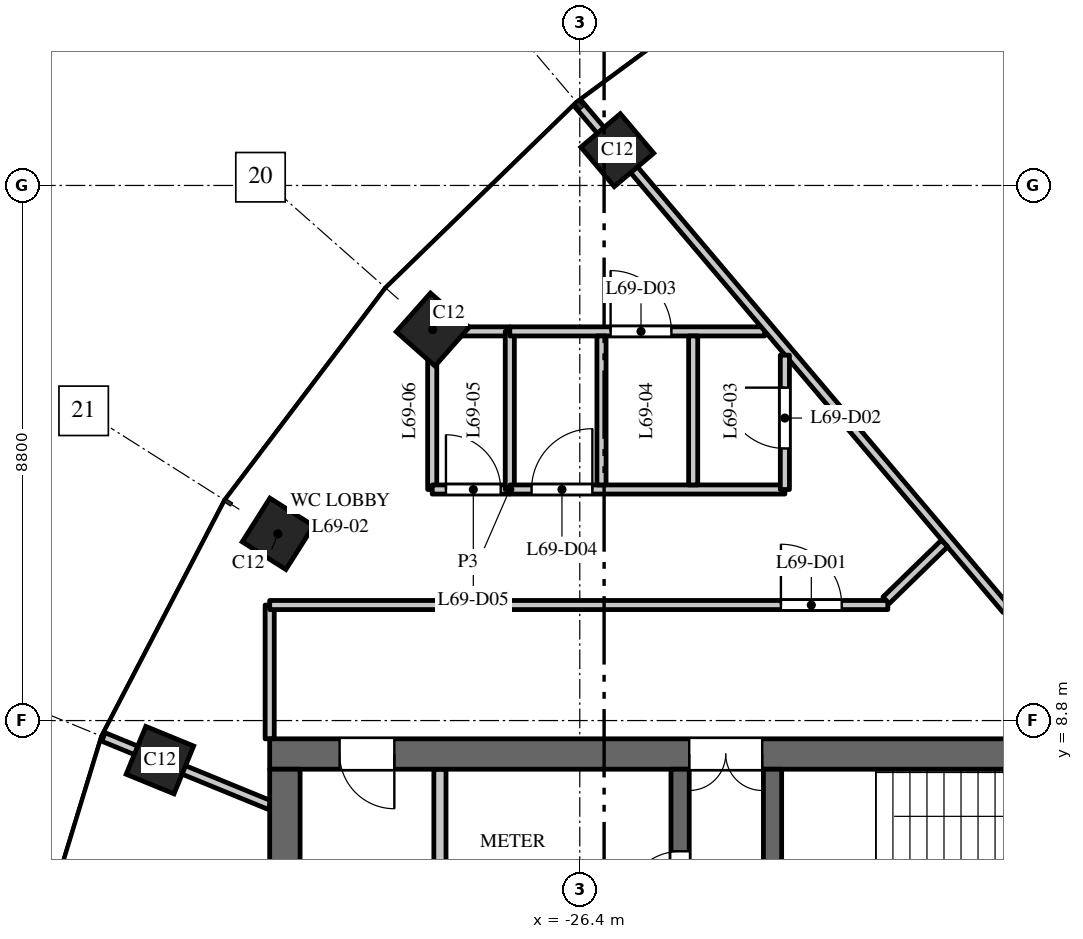
"""IFC4 building model, lengths in metres.
Left out: names, types, materials, properties, quantities, classifications, styles, units other than length and angle.
Written with IfcOpenShell. Run it as: python <this file> out.ifc"""

import sys

from ifc_helpers import new_model, si_unit, direction, frame, frame_2d, origin, origin_2d, place, context, subcontext, project, spatial, rectangle, extrude, element, fill, save


model = new_model("IFC4")
c1 = context("Model", 3, precision=1e-05, world=origin(), true_north=direction((0.0, 1.0)))
c2 = subcontext(c1, "Body", "Model", "MODEL_VIEW")
j1 = project(units=[si_unit("LENGTHUNIT", "METRE"), si_unit("PLANEANGLEUNIT", "RADIAN")], contexts=[c1])
p1 = place(None, origin())
s1 = spatial("IfcSite", under=j1, at=p1, CompositionType="ELEMENT")
p2 = place(p1, origin())
s2 = spatial("IfcBuilding", under=s1, at=p2, CompositionType="ELEMENT")
p3 = place(p2, frame((0.0, 0.0, 319.0)))
s3 = spatial("IfcBuildingStorey", under=s2, at=p3, CompositionType="ELEMENT", Elevation=319.0)
for number, where, z_axis, x_axis in (
    (1, (-25.783, 18.18, 0.0), (0.0, 0.0, 1.0), (-0.763, -0.646, 0.0)),
    (2, (-28.819, 15.23, 0.0), (0.0, 0.0, 1.0), (-0.663, -0.749, 0.0)),
    (3, (-31.365, 11.871, 0.0), (0.0, 0.0, 1.0), (-0.535, -0.845, 0.0)),
    (4, (-33.305, 8.149, 0.0), (0.0, 0.0, 1.0), (-0.379, -0.925, 0.0)),
):
    element("IfcColumn", number, at=place(p3, frame(where, z_axis=z_axis, x_axis=x_axis)), inside=s3, PredefinedType="COLUMN", context=c2, shape_type="SweptSolid", body=[
        extrude(rectangle(XDim=0.85, YDim=0.85, at=origin_2d()), origin(), (0.0, 0.0, 1.0), 4.0),
    ])
p4 = place(p3, frame((-16.5, 8.25, 0.0), z_axis=(0.0, 0.0, 1.0), x_axis=(-1.0, 0.0, 0.0)))
e5 = element("IfcWall", 5, at=p4, inside=s3, PredefinedType="SHEAR", context=c2, shape_type="SweptSolid", body=[
    extrude(rectangle(XDim=15.0, YDim=0.5, at=frame_2d((7.5, 0.0))), origin(), (0.0, 0.0, 1.0), 3.7),
])
p5 = place(p4, frame((6.9, 0.0, 0.0)))
e6 = element("IfcOpeningElement", 6, at=p5, cuts=e5, PredefinedType="OPENING", context=c2, shape_type="SweptSolid", body=[
    extrude(rectangle(XDim=1.2, YDim=2.1, at=frame_2d((0.6, 1.05))), frame((0.0, 0.26, 0.0), z_axis=(0.0, -1.0, 0.0), x_axis=(1.0, 0.0, 0.0)), (0.0, 0.0, 1.0), 0.52),
])
p6 = place(p4, frame((12.95, 0.0, 0.0)))
e7 = element("IfcOpeningElement", 7, at=p6, cuts=e5, PredefinedType="OPENING", context=c2, shape_type="SweptSolid", body=[
    extrude(rectangle(XDim=0.9, YDim=2.1, at=frame_2d((0.45, 1.05))), frame((0.0, 0.26, 0.0), z_axis=(0.0, -1.0, 0.0), x_axis=(1.0, 0.0, 0.0)), (0.0, 0.0, 1.0), 0.52),
])
p7 = place(p3, frame((-24.75, -8.0, 0.0), z_axis=(0.0, 0.0, 1.0), x_axis=(0.0, 1.0, 0.0)))
e8 = element("IfcWall", 8, at=p7, inside=s3, PredefinedType="SHEAR", context=c2, shape_type="SweptSolid", body=[
    extrude(rectangle(XDim=16.0, YDim=0.3, at=frame_2d((8.0, 0.0))), origin(), (0.0, 0.0, 1.0), 3.7),
])
p8 = place(p7, frame((4.425, 0.0, 0.0)))
e9 = element("IfcOpeningElement", 9, at=p8, cuts=e8, PredefinedType="OPENING", context=c2, shape_type="SweptSolid", body=[
    extrude(rectangle(XDim=1.1, YDim=2.1, at=frame_2d((0.55, 1.05))), frame((0.0, 0.16, 0.0), z_axis=(0.0, -1.0, 0.0), x_axis=(1.0, 0.0, 0.0)), (0.0, 0.0, 1.0), 0.32),
])
p9 = place(p7, frame((7.45, 0.0, 0.0)))
e10 = element("IfcOpeningElement", 10, at=p9, cuts=e8, PredefinedType="OPENING", context=c2, shape_type="SweptSolid", body=[
    extrude(rectangle(XDim=1.1, YDim=2.1, at=frame_2d((0.55, 1.05))), frame((0.0, 0.16, 0.0), z_axis=(0.0, -1.0, 0.0), x_axis=(1.0, 0.0, 0.0)), (0.0, 0.0, 1.0), 0.32),
])
p10 = place(p7, frame((10.575, 0.0, 0.0)))
e11 = element("IfcOpeningElement", 11, at=p10, cuts=e8, PredefinedType="OPENING", context=c2, shape_type="SweptSolid", body=[
    extrude(rectangle(XDim=0.9, YDim=2.1, at=frame_2d((0.45, 1.05))), frame((0.0, 0.16, 0.0), z_axis=(0.0, -1.0, 0.0), x_axis=(1.0, 0.0, 0.0)), (0.0, 0.0, 1.0), 0.32),
])
p11 = place(p7, frame((13.75, 0.0, 0.0)))
e12 = element("IfcOpeningElement", 12, at=p11, cuts=e8, PredefinedType="OPENING", context=c2, shape_type="SweptSolid", body=[
    extrude(rectangle(XDim=0.9, YDim=2.1, at=frame_2d((0.45, 1.05))), frame((0.0, 0.16, 0.0), z_axis=(0.0, -1.0, 0.0), x_axis=(1.0, 0.0, 0.0)), (0.0, 0.0, 1.0), 0.32),
])
p12 = place(p7, frame((1.35, 0.0, 0.0)))
e13 = element("IfcOpeningElement", 13, at=p12, cuts=e8, PredefinedType="OPENING", context=c2, shape_type="SweptSolid", body=[
    extrude(rectangle(XDim=0.9, YDim=2.1, at=frame_2d((0.45, 1.05))), frame((0.0, 0.16, 0.0), z_axis=(0.0, -1.0, 0.0), x_axis=(1.0, 0.0, 0.0)), (0.0, 0.0, 1.0), 0.32),
])
p13 = place(p3, frame((-31.25, -8.0, 0.0), z_axis=(0.0, 0.0, 1.0), x_axis=(0.0, 1.0, 0.0)))
e14 = element("IfcWall", 14, at=p13, inside=s3, PredefinedType="SHEAR", context=c2, shape_type="SweptSolid", body=[
    extrude(rectangle(XDim=16.0, YDim=0.5, at=frame_2d((8.0, 0.0))), origin(), (0.0, 0.0, 1.0), 3.7),
])
p14 = place(p3, frame((-28.7, 4.75, 0.0), z_axis=(0.0, 0.0, 1.0), x_axis=(0.0, 1.0, 0.0)))
e15 = element("IfcWall", 15, at=p14, inside=s3, PredefinedType="PARTITIONING", context=c2, shape_type="SweptSolid", body=[
    extrude(rectangle(XDim=3.25, YDim=0.2, at=frame_2d((1.625, 0.0))), origin(), (0.0, 0.0, 1.0), 3.7),
])
p15 = place(p3, frame((-23.23, 2.25, 0.0), z_axis=(0.0, 0.0, 1.0), x_axis=(0.0, 1.0, 0.0)))
e16 = element("IfcWall", 16, at=p15, inside=s3, PredefinedType="SHEAR", context=c2, shape_type="SweptSolid", body=[
    extrude(rectangle(XDim=5.75, YDim=0.3, at=frame_2d((2.875, 0.0))), origin(), (0.0, 0.0, 1.0), 3.7),
])
p16 = place(p15, frame((0.6, 0.0, 0.0)))
e17 = element("IfcOpeningElement", 17, at=p16, cuts=e16, PredefinedType="OPENING", context=c2, shape_type="SweptSolid", body=[
    extrude(rectangle(XDim=1.0, YDim=2.1, at=frame_2d((0.5, 1.05))), frame((0.0, 0.16, 0.0), z_axis=(0.0, -1.0, 0.0), x_axis=(1.0, 0.0, 0.0)), (0.0, 0.0, 1.0), 0.32),
])
p17 = place(p3, frame((-34.234, 8.53, 0.0), z_axis=(0.0, 0.0, 1.0), x_axis=(0.925344112436, -0.379128307542, 0.0)))
e18 = element("IfcWall", 18, at=p17, inside=s3, PredefinedType="PARTITIONING", context=c2, shape_type="SweptSolid", body=[
    extrude(rectangle(XDim=2.954, YDim=0.15, at=frame_2d((1.477, 0.0))), origin(), (0.0, 0.0, 1.0), 3.0),
])
p18 = place(p3, frame((-31.5, 8.5, 0.0), z_axis=(0.0, 0.0, 1.0), x_axis=(0.0, 1.0, 0.0)))
e19 = element("IfcWall", 19, at=p18, inside=s3, PredefinedType="PARTITIONING", context=c2, shape_type="SweptSolid", body=[
    extrude(rectangle(XDim=2.2, YDim=0.15, at=frame_2d((1.1, 0.0))), origin(), (0.0, 0.0, 1.0), 3.7),
])
p19 = place(p3, frame((-31.5, 10.7, 0.0), z_axis=(0.0, 0.0, 1.0), x_axis=(1.0, 0.0, 0.0)))
e20 = element("IfcWall", 20, at=p19, inside=s3, PredefinedType="PARTITIONING", context=c2, shape_type="SweptSolid", body=[
    extrude(rectangle(XDim=10.166, YDim=0.15, at=frame_2d((5.083, 0.0))), origin(), (0.0, 0.0, 1.0), 3.1),
])
p20 = place(p19, frame((8.408, 0.0, 0.0)))
e21 = element("IfcOpeningElement", 21, at=p20, cuts=e20, PredefinedType="OPENING", context=c2, shape_type="SweptSolid", body=[
    extrude(rectangle(XDim=1.0, YDim=2.1, at=frame_2d((0.5, 1.05))), frame((0.0, 0.085, 0.0), z_axis=(0.0, -1.0, 0.0), x_axis=(1.0, 0.0, 0.0)), (0.0, 0.0, 1.0), 0.17),
])
p21 = place(p3, frame((-28.827, 12.6, 0.0), z_axis=(0.0, 0.0, 1.0), x_axis=(0.0, 1.0, 0.0)))
e22 = element("IfcWall", 22, at=p21, inside=s3, PredefinedType="PARTITIONING", context=c2, shape_type="SweptSolid", body=[
    extrude(rectangle(XDim=2.596, YDim=0.15, at=frame_2d((1.298, 0.0))), origin(), (0.0, 0.0, 1.0), 3.0),
])
p22 = place(p3, frame((-28.827, 12.6, 0.0), z_axis=(0.0, 0.0, 1.0), x_axis=(1.0, 0.0, 0.0)))
e23 = element("IfcWall", 23, at=p22, inside=s3, PredefinedType="PARTITIONING", context=c2, shape_type="SweptSolid", body=[
    extrude(rectangle(XDim=1.276, YDim=0.15, at=frame_2d((0.638, 0.0))), origin(), (0.0, 0.0, 1.0), 3.7),
])
p23 = place(p22, frame((0.226, 0.0, 0.0)))
e24 = element("IfcOpeningElement", 24, at=p23, cuts=e23, PredefinedType="OPENING", context=c2, shape_type="SweptSolid", body=[
    extrude(rectangle(XDim=0.9, YDim=2.1, at=frame_2d((0.45, 1.05))), frame((0.0, 0.085, 0.0), z_axis=(0.0, -1.0, 0.0), x_axis=(1.0, 0.0, 0.0)), (0.0, 0.0, 1.0), 0.17),
])
p24 = place(p3, frame((-28.823, 15.2, 0.0), z_axis=(0.0, 0.0, 1.0), x_axis=(1.0, 0.0, 0.0)))
e25 = element("IfcWall", 25, at=p24, inside=s3, PredefinedType="PARTITIONING", context=c2, shape_type="SweptSolid", body=[
    extrude(rectangle(XDim=1.272, YDim=0.15, at=frame_2d((0.636, 0.0))), origin(), (0.0, 0.0, 1.0), 3.0),
])
p25 = place(p3, frame((-27.551, 12.6, 0.0), z_axis=(0.0, 0.0, 1.0), x_axis=(0.0, 1.0, 0.0)))
e26 = element("IfcWall", 26, at=p25, inside=s3, PredefinedType="PARTITIONING", context=c2, shape_type="SweptSolid", body=[
    extrude(rectangle(XDim=2.6, YDim=0.15, at=frame_2d((1.3, 0.0))), origin(), (0.0, 0.0, 1.0), 3.7),
])
p26 = place(p3, frame((-27.551, 12.6, 0.0), z_axis=(0.0, 0.0, 1.0), x_axis=(1.0, 0.0, 0.0)))
e27 = element("IfcWall", 27, at=p26, inside=s3, PredefinedType="PARTITIONING", context=c2, shape_type="SweptSolid", body=[
    extrude(rectangle(XDim=4.524, YDim=0.15, at=frame_2d((2.262, 0.0))), origin(), (0.0, 0.0, 1.0), 3.7),
])
p27 = place(p26, frame((0.358, 0.0, 0.0)))
e28 = element("IfcOpeningElement", 28, at=p27, cuts=e27, PredefinedType="OPENING", context=c2, shape_type="SweptSolid", body=[
    extrude(rectangle(XDim=1.0, YDim=2.1, at=frame_2d((0.5, 1.05))), frame((0.0, 0.085, 0.0), z_axis=(0.0, -1.0, 0.0), x_axis=(1.0, 0.0, 0.0)), (0.0, 0.0, 1.0), 0.17),
])
p28 = place(p3, frame((-27.551, 15.2, 0.0), z_axis=(0.0, 0.0, 1.0), x_axis=(1.0, 0.0, 0.0)))
e29 = element("IfcWall", 29, at=p28, inside=s3, PredefinedType="PARTITIONING", context=c2, shape_type="SweptSolid", body=[
    extrude(rectangle(XDim=4.192, YDim=0.15, at=frame_2d((2.096, 0.0))), origin(), (0.0, 0.0, 1.0), 3.7),
])
p29 = place(p28, frame((1.658, 0.0, 0.0)))
e30 = element("IfcOpeningElement", 30, at=p29, cuts=e29, PredefinedType="OPENING", context=c2, shape_type="SweptSolid", body=[
    extrude(rectangle(XDim=1.0, YDim=2.1, at=frame_2d((0.5, 1.05))), frame((0.0, 0.085, 0.0), z_axis=(0.0, -1.0, 0.0), x_axis=(1.0, 0.0, 0.0)), (0.0, 0.0, 1.0), 0.17),
])
p30 = place(p3, frame((-26.429, 18.946, 0.0), z_axis=(0.0, 0.0, 1.0), x_axis=(0.646342728412, -0.763047231453, 0.0)))
e31 = element("IfcWall", 31, at=p30, inside=s3, PredefinedType="PARTITIONING", context=c2, shape_type="SweptSolid", body=[
    extrude(rectangle(XDim=10.901, YDim=0.15, at=frame_2d((5.451, 0.0))), origin(), (0.0, 0.0, 1.0), 2.75),
])
for number, where, z_axis, x_axis in (
    (32, (-26.043, 12.675, 0.0), (0.0, 0.0, 1.0), (0.0, 1.0, 0.0)),
    (33, (-24.535, 12.675, 0.0), (0.0, 0.0, 1.0), (0.0, 1.0, 0.0)),
):
    element("IfcWall", number, at=place(p3, frame(where, z_axis=z_axis, x_axis=x_axis)), inside=s3, PredefinedType="PARTITIONING", context=c2, shape_type="SweptSolid", body=[
        extrude(rectangle(XDim=2.45, YDim=0.15, at=frame_2d((1.225, 0.0))), origin(), (0.0, 0.0, 1.0), 3.7),
    ])
p31 = place(p3, frame((-23.027, 12.6, 0.0), z_axis=(0.0, 0.0, 1.0), x_axis=(0.0, 1.0, 0.0)))
e34 = element("IfcWall", 34, at=p31, inside=s3, PredefinedType="PARTITIONING", context=c2, shape_type="SweptSolid", body=[
    extrude(rectangle(XDim=2.209, YDim=0.15, at=frame_2d((1.104, 0.0))), origin(), (0.0, 0.0, 1.0), 3.7),
])
p32 = place(p31, frame((0.675, 0.0, 0.0)))
e35 = element("IfcOpeningElement", 35, at=p32, cuts=e34, PredefinedType="OPENING", context=c2, shape_type="SweptSolid", body=[
    extrude(rectangle(XDim=1.0, YDim=2.1, at=frame_2d((0.5, 1.05))), frame((0.0, 0.085, 0.0), z_axis=(0.0, -1.0, 0.0), x_axis=(1.0, 0.0, 0.0)), (0.0, 0.0, 1.0), 0.17),
])
p33 = place(p3, frame((-21.362, 10.778, 0.0), z_axis=(0.0, 0.0, 1.0), x_axis=(0.716871037277, 0.697205791652, 0.0)))
e36 = element("IfcWall", 36, at=p33, inside=s3, PredefinedType="PARTITIONING", context=c2, shape_type="SweptSolid", body=[
    extrude(rectangle(XDim=1.341, YDim=0.15, at=frame_2d((0.67, 0.0))), origin(), (0.0, 0.0, 1.0), 3.7),
])
p34 = place(p5, origin())
e37 = element("IfcDoor", 37, at=p34, inside=s3, OperationType="DOUBLE_DOOR_DOUBLE_SWING", PredefinedType="DOOR", context=c2, shape_type="SweptSolid", body=[
    extrude(rectangle(XDim=1.2, YDim=2.1, at=frame_2d((0.6, 1.05))), frame((0.0, 0.025, 0.0), z_axis=(0.0, -1.0, 0.0), x_axis=(1.0, 0.0, 0.0)), (0.0, 0.0, 1.0), 0.05),
])
fill(e6, e37)
p35 = place(p11, origin())
e38 = element("IfcDoor", 38, at=p35, inside=s3, OperationType="SINGLE_SWING_RIGHT", PredefinedType="DOOR", context=c2, shape_type="SweptSolid", body=[
    extrude(rectangle(XDim=0.9, YDim=2.1, at=frame_2d((0.45, 1.05))), frame((0.0, 0.025, 0.0), z_axis=(0.0, -1.0, 0.0), x_axis=(1.0, 0.0, 0.0)), (0.0, 0.0, 1.0), 0.05),
])
fill(e12, e38)
p36 = place(p6, origin())
e39 = element("IfcDoor", 39, at=p36, inside=s3, OperationType="SINGLE_SWING_RIGHT", PredefinedType="DOOR", context=c2, shape_type="SweptSolid", body=[
    extrude(rectangle(XDim=0.9, YDim=2.1, at=frame_2d((0.45, 1.05))), frame((0.0, 0.025, 0.0), z_axis=(0.0, -1.0, 0.0), x_axis=(1.0, 0.0, 0.0)), (0.0, 0.0, 1.0), 0.05),
])
fill(e7, e39)
p37 = place(p20, origin())
e40 = element("IfcDoor", 40, at=p37, inside=s3, OperationType="SINGLE_SWING_LEFT", PredefinedType="DOOR", context=c2, shape_type="SweptSolid", body=[
    extrude(rectangle(XDim=1.0, YDim=2.1, at=frame_2d((0.5, 1.05))), frame((0.0, 0.025, 0.0), z_axis=(0.0, -1.0, 0.0), x_axis=(1.0, 0.0, 0.0)), (0.0, 0.0, 1.0), 0.05),
])
fill(e21, e40)
p38 = place(p32, origin())
e41 = element("IfcDoor", 41, at=p38, inside=s3, OperationType="SINGLE_SWING_RIGHT", PredefinedType="DOOR", context=c2, shape_type="SweptSolid", body=[
    extrude(rectangle(XDim=1.0, YDim=2.1, at=frame_2d((0.5, 1.05))), frame((0.0, 0.025, 0.0), z_axis=(0.0, -1.0, 0.0), x_axis=(1.0, 0.0, 0.0)), (0.0, 0.0, 1.0), 0.05),
])
fill(e35, e41)
p39 = place(p29, origin())
e42 = element("IfcDoor", 42, at=p39, inside=s3, OperationType="SINGLE_SWING_LEFT", PredefinedType="DOOR", context=c2, shape_type="SweptSolid", body=[
    extrude(rectangle(XDim=1.0, YDim=2.1, at=frame_2d((0.5, 1.05))), frame((0.0, 0.025, 0.0), z_axis=(0.0, -1.0, 0.0), x_axis=(1.0, 0.0, 0.0)), (0.0, 0.0, 1.0), 0.05),
])
fill(e30, e42)
p40 = place(p27, origin())
e43 = element("IfcDoor", 43, at=p40, inside=s3, OperationType="SINGLE_SWING_RIGHT", PredefinedType="DOOR", context=c2, shape_type="SweptSolid", body=[
    extrude(rectangle(XDim=1.0, YDim=2.1, at=frame_2d((0.5, 1.05))), frame((0.0, 0.025, 0.0), z_axis=(0.0, -1.0, 0.0), x_axis=(1.0, 0.0, 0.0)), (0.0, 0.0, 1.0), 0.05),
])
fill(e28, e43)
p41 = place(p23, origin())
e44 = element("IfcDoor", 44, at=p41, inside=s3, OperationType="SINGLE_SWING_LEFT", PredefinedType="DOOR", context=c2, shape_type="SweptSolid", body=[
    extrude(rectangle(XDim=0.9, YDim=2.1, at=frame_2d((0.45, 1.05))), frame((0.0, 0.025, 0.0), z_axis=(0.0, -1.0, 0.0), x_axis=(1.0, 0.0, 0.0)), (0.0, 0.0, 1.0), 0.05),
])
fill(e24, e44)
save(model, sys.argv[1])
